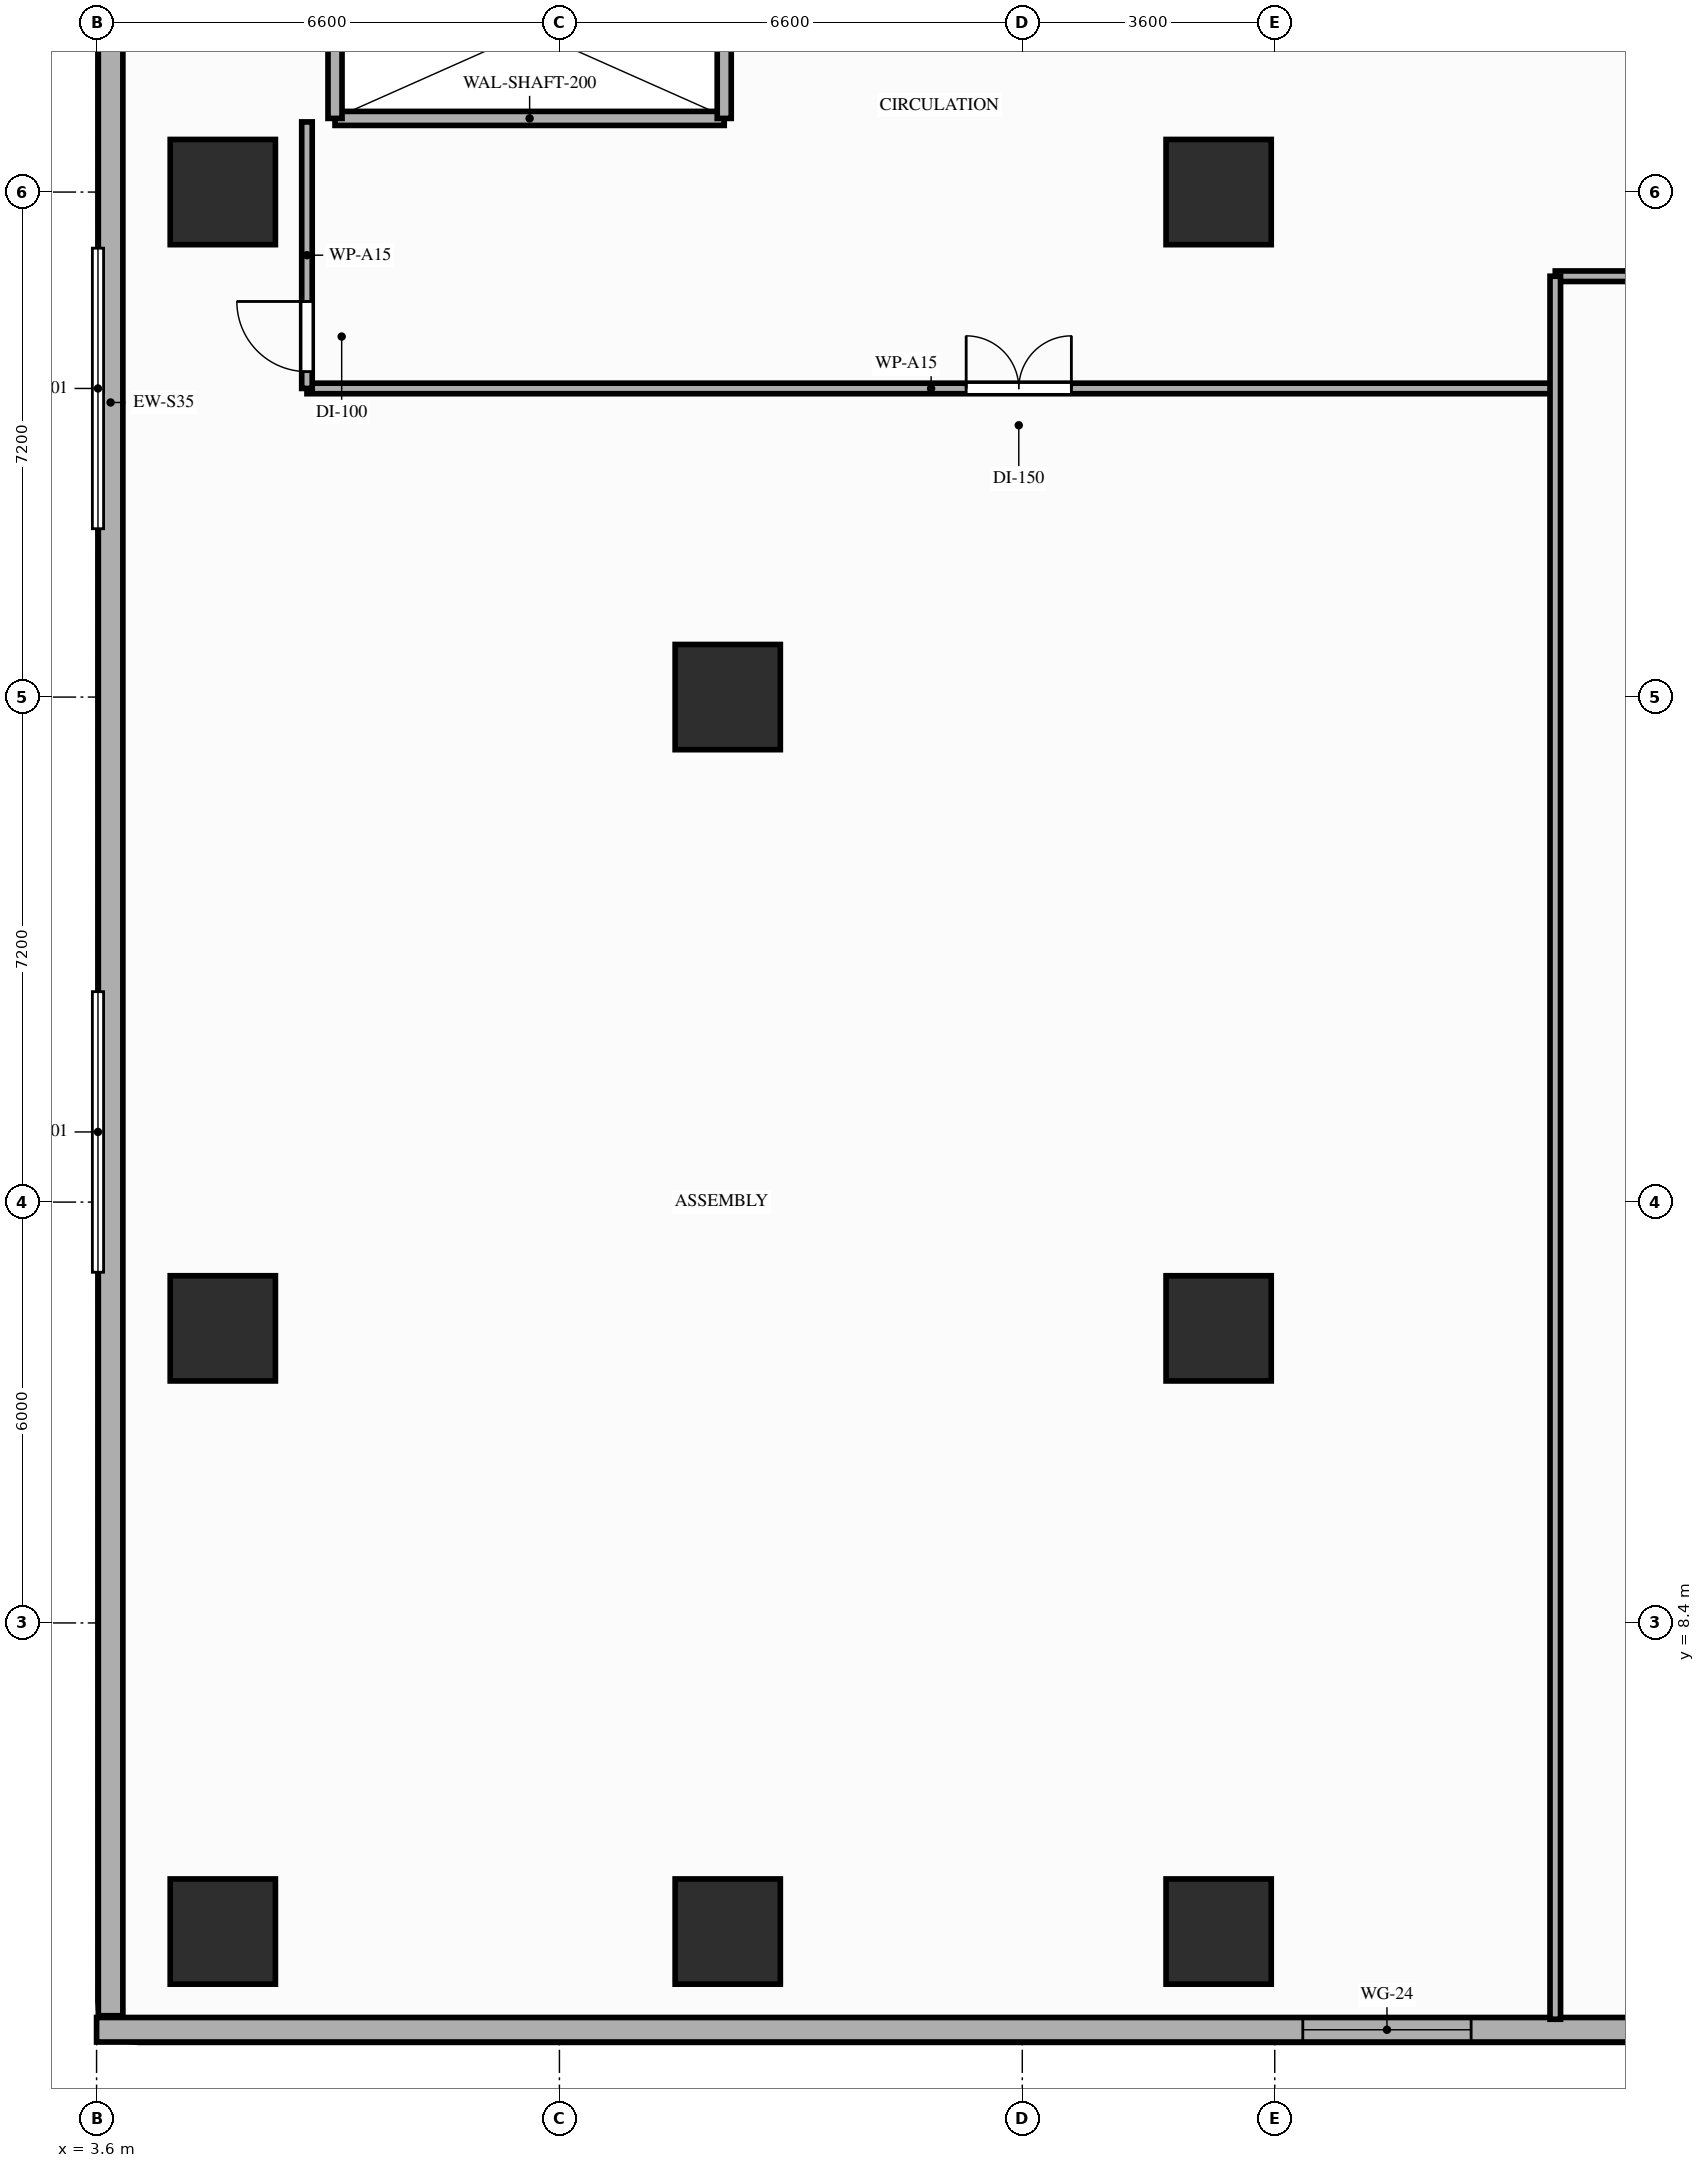
"""IFC4 building model, lengths in metres.
Left out: names, types, materials, properties, quantities, classifications, styles, units other than length and angle.
Written with IfcOpenShell. Run it as: python <this file> out.ifc"""

import sys

from ifc_helpers import new_model, si_unit, direction, frame, frame_2d, origin, origin_2d, place, context, subcontext, project, spatial, rectangle, extrude, element, fill, save


model = new_model("IFC4")
c1 = context("Model", 3, precision=1e-05, world=origin(), true_north=direction((0.0, 1.0)))
c2 = subcontext(c1, "Body", "Model", "MODEL_VIEW")
j1 = project(units=[si_unit("LENGTHUNIT", "METRE"), si_unit("PLANEANGLEUNIT", "RADIAN")], contexts=[c1])
p1 = place(None, origin())
s1 = spatial("IfcSite", under=j1, at=p1, CompositionType="ELEMENT")
p2 = place(p1, origin())
s2 = spatial("IfcBuilding", under=s1, at=p2, CompositionType="ELEMENT")
p3 = place(p2, frame((0.0, 0.0, 13.0)))
s3 = spatial("IfcBuildingStorey", under=s2, at=p3, CompositionType="ELEMENT", Elevation=13.0)
for number, where, z_axis, x_axis in (
    (1, (5.4, 12.6, 0.0), (0.0, 0.0, 1.0), (1.0, 0.0, 0.0)),
    (2, (19.6, 12.6, 0.0), (0.0, 0.0, 1.0), (1.0, 0.0, 0.0)),
    (3, (5.4, 28.8, 0.0), (0.0, 0.0, 1.0), (1.0, 0.0, 0.0)),
    (4, (19.6, 28.8, 0.0), (0.0, 0.0, 1.0), (1.0, 0.0, 0.0)),
    (5, (5.4, 4.0, 0.0), (0.0, 0.0, 1.0), (1.0, 0.0, 0.0)),
    (6, (12.6, 4.0, 0.0), (0.0, 0.0, 1.0), (1.0, 0.0, 0.0)),
    (7, (19.6, 4.0, 0.0), (0.0, 0.0, 1.0), (1.0, 0.0, 0.0)),
    (8, (12.6, 21.6, 0.0), (0.0, 0.0, 1.0), (1.0, 0.0, 0.0)),
):
    element("IfcColumn", number, at=place(p3, frame(where, z_axis=z_axis, x_axis=x_axis)), inside=s3, PredefinedType="COLUMN", context=c2, shape_type="SweptSolid", body=[
        extrude(rectangle(XDim=1.5, YDim=1.5, at=origin_2d()), origin(), (0.0, 0.0, 1.0), 4.6),
    ])
p4 = place(p3, frame((3.6, 2.6, 0.0), z_axis=(0.0, 0.0, 1.0), x_axis=(1.0, 0.0, 0.0)))
e9 = element("IfcWall", 9, at=p4, inside=s3, PredefinedType="STANDARD", context=c2, shape_type="SweptSolid", body=[
    extrude(rectangle(XDim=69.6, YDim=0.35, at=frame_2d((34.8, 0.0))), origin(), (0.0, 0.0, 1.0), 4.35),
])
p5 = place(p4, frame((17.2, 0.0, 0.9)))
e10 = element("IfcOpeningElement", 10, at=p5, cuts=e9, PredefinedType="OPENING", context=c2, shape_type="SweptSolid", body=[
    extrude(rectangle(XDim=2.4, YDim=2.15, at=frame_2d((1.2, 1.075))), frame((0.0, 0.185, 0.0), z_axis=(0.0, -1.0, 0.0), x_axis=(1.0, 0.0, 0.0)), (0.0, 0.0, 1.0), 0.37),
])
p6 = place(p4, frame((24.6, 0.0, 0.9)))
e11 = element("IfcOpeningElement", 11, at=p6, cuts=e9, PredefinedType="OPENING", context=c2, shape_type="SweptSolid", body=[
    extrude(rectangle(XDim=2.4, YDim=2.15, at=frame_2d((1.2, 1.075))), frame((0.0, 0.185, 0.0), z_axis=(0.0, -1.0, 0.0), x_axis=(1.0, 0.0, 0.0)), (0.0, 0.0, 1.0), 0.37),
])
p7 = place(p4, frame((36.2, 0.0, 0.9)))
e12 = element("IfcOpeningElement", 12, at=p7, cuts=e9, PredefinedType="OPENING", context=c2, shape_type="SweptSolid", body=[
    extrude(rectangle(XDim=2.4, YDim=2.15, at=frame_2d((1.2, 1.075))), frame((0.0, 0.185, 0.0), z_axis=(0.0, -1.0, 0.0), x_axis=(1.0, 0.0, 0.0)), (0.0, 0.0, 1.0), 0.37),
])
p8 = place(p4, frame((48.4, 0.0, 0.9)))
e13 = element("IfcOpeningElement", 13, at=p8, cuts=e9, PredefinedType="OPENING", context=c2, shape_type="SweptSolid", body=[
    extrude(rectangle(XDim=2.4, YDim=2.15, at=frame_2d((1.2, 1.075))), frame((0.0, 0.185, 0.0), z_axis=(0.0, -1.0, 0.0), x_axis=(1.0, 0.0, 0.0)), (0.0, 0.0, 1.0), 0.37),
])
p9 = place(p4, frame((64.0, 0.0, 0.9)))
e14 = element("IfcOpeningElement", 14, at=p9, cuts=e9, PredefinedType="OPENING", context=c2, shape_type="SweptSolid", body=[
    extrude(rectangle(XDim=2.4, YDim=2.15, at=frame_2d((1.2, 1.075))), frame((0.0, 0.185, 0.0), z_axis=(0.0, -1.0, 0.0), x_axis=(1.0, 0.0, 0.0)), (0.0, 0.0, 1.0), 0.37),
])
p10 = place(p3, frame((3.8, 48.8, 0.0), z_axis=(0.0, 0.0, 1.0), x_axis=(0.0, -1.0, 0.0)))
e15 = element("IfcWall", 15, at=p10, inside=s3, PredefinedType="STANDARD", context=c2, shape_type="SweptSolid", body=[
    extrude(rectangle(XDim=46.0, YDim=0.35, at=frame_2d((23.0, 0.0))), origin(), (0.0, 0.0, 1.0), 4.35),
])
p11 = place(p3, frame((7.0, 29.85, 0.0), z_axis=(0.0, 0.0, 1.0), x_axis=(1.0, 0.0, 0.0)))
e16 = element("IfcWall", 16, at=p11, inside=s3, PredefinedType="MOVABLE", context=c2, shape_type="SweptSolid", body=[
    extrude(rectangle(XDim=5.55, YDim=0.2, at=frame_2d((2.775, 0.0))), origin(), (0.0, 0.0, 1.0), 4.35),
])
for number, where, z_axis, x_axis in (
    (17, (7.0, 29.85, 0.0), (0.0, 0.0, 1.0), (0.0, 1.0, 0.0)),
    (18, (12.55, 29.85, 0.0), (0.0, 0.0, 1.0), (0.0, 1.0, 0.0)),
):
    element("IfcWall", number, at=place(p3, frame(where, z_axis=z_axis, x_axis=x_axis)), inside=s3, PredefinedType="MOVABLE", context=c2, shape_type="SweptSolid", body=[
        extrude(rectangle(XDim=2.5, YDim=0.2, at=frame_2d((1.25, 0.0))), origin(), (0.0, 0.0, 1.0), 4.35),
    ])
p12 = place(p3, frame((6.6, 26.0, 0.0), z_axis=(0.0, 0.0, 1.0), x_axis=(1.0, 0.0, 0.0)))
e19 = element("IfcWall", 19, at=p12, inside=s3, PredefinedType="PARTITIONING", context=c2, shape_type="SweptSolid", body=[
    extrude(rectangle(XDim=17.8, YDim=0.15, at=frame_2d((8.9, 0.0))), origin(), (0.0, 0.0, 1.0), 3.63),
])
p13 = place(p12, frame((9.4, 0.0, 0.0)))
e20 = element("IfcOpeningElement", 20, at=p13, cuts=e19, PredefinedType="OPENING", context=c2, shape_type="SweptSolid", body=[
    extrude(rectangle(XDim=1.5, YDim=2.18, at=frame_2d((0.75, 1.09))), frame((0.0, 0.085, 0.0), z_axis=(0.0, -1.0, 0.0), x_axis=(1.0, 0.0, 0.0)), (0.0, 0.0, 1.0), 0.17),
])
p14 = place(p3, frame((24.4, 27.6, 0.0), z_axis=(0.0, 0.0, 1.0), x_axis=(1.0, 0.0, 0.0)))
e21 = element("IfcWall", 21, at=p14, inside=s3, PredefinedType="PARTITIONING", context=c2, shape_type="SweptSolid", body=[
    extrude(rectangle(XDim=26.4, YDim=0.15, at=frame_2d((13.2, 0.0))), origin(), (0.0, 0.0, 1.0), 3.63),
])
p15 = place(p14, frame((7.6, 0.0, 0.0)))
e22 = element("IfcOpeningElement", 22, at=p15, cuts=e21, PredefinedType="OPENING", context=c2, shape_type="SweptSolid", body=[
    extrude(rectangle(XDim=1.5, YDim=2.18, at=frame_2d((0.75, 1.09))), frame((0.0, 0.085, 0.0), z_axis=(0.0, -1.0, 0.0), x_axis=(1.0, 0.0, 0.0)), (0.0, 0.0, 1.0), 0.17),
])
p16 = place(p3, frame((6.6, 26.0, 0.0), z_axis=(0.0, 0.0, 1.0), x_axis=(0.0, 1.0, 0.0)))
e23 = element("IfcWall", 23, at=p16, inside=s3, PredefinedType="PARTITIONING", context=c2, shape_type="SweptSolid", body=[
    extrude(rectangle(XDim=3.8, YDim=0.15, at=frame_2d((1.9, 0.0))), origin(), (0.0, 0.0, 1.0), 3.63),
])
p17 = place(p16, frame((0.24, 0.0, 0.0)))
e24 = element("IfcOpeningElement", 24, at=p17, cuts=e23, PredefinedType="OPENING", context=c2, shape_type="SweptSolid", body=[
    extrude(rectangle(XDim=1.0, YDim=2.15, at=frame_2d((0.5, 1.075))), frame((0.0, 0.085, 0.0), z_axis=(0.0, -1.0, 0.0), x_axis=(1.0, 0.0, 0.0)), (0.0, 0.0, 1.0), 0.17),
])
p18 = place(p3, frame((24.4, 2.75, 0.0), z_axis=(0.0, 0.0, 1.0), x_axis=(0.0, 1.0, 0.0)))
e25 = element("IfcWall", 25, at=p18, inside=s3, PredefinedType="PARTITIONING", context=c2, shape_type="SweptSolid", body=[
    extrude(rectangle(XDim=24.85, YDim=0.15, at=frame_2d((12.425, 0.0))), origin(), (0.0, 0.0, 1.0), 3.63),
])
p19 = place(p5, origin())
e26 = element("IfcWindow", 26, at=p19, inside=s3, PartitioningType="SINGLE_PANEL", PredefinedType="WINDOW", context=c2, shape_type="SweptSolid", body=[
    extrude(rectangle(XDim=2.4, YDim=2.15, at=frame_2d((1.2, 1.075))), frame((0.0, 0.03, 0.0), z_axis=(0.0, -1.0, 0.0), x_axis=(1.0, 0.0, 0.0)), (0.0, 0.0, 1.0), 0.06),
])
fill(e10, e26)
p20 = place(p17, origin())
e27 = element("IfcDoor", 27, at=p20, inside=s3, OperationType="SINGLE_SWING_RIGHT", PredefinedType="DOOR", context=c2, shape_type="SweptSolid", body=[
    extrude(rectangle(XDim=1.0, YDim=2.15, at=frame_2d((0.5, 1.075))), frame((0.0, 0.025, 0.0), z_axis=(0.0, -1.0, 0.0), x_axis=(1.0, 0.0, 0.0)), (0.0, 0.0, 1.0), 0.05),
])
fill(e24, e27)
p21 = place(p13, origin())
e28 = element("IfcDoor", 28, at=p21, inside=s3, OperationType="DOUBLE_DOOR_SINGLE_SWING", PredefinedType="DOOR", context=c2, shape_type="SweptSolid", body=[
    extrude(rectangle(XDim=1.5, YDim=2.18, at=frame_2d((0.75, 1.09))), frame((0.0, 0.025, 0.0), z_axis=(0.0, -1.0, 0.0), x_axis=(1.0, 0.0, 0.0)), (0.0, 0.0, 1.0), 0.05),
])
fill(e20, e28)
save(model, sys.argv[1])
